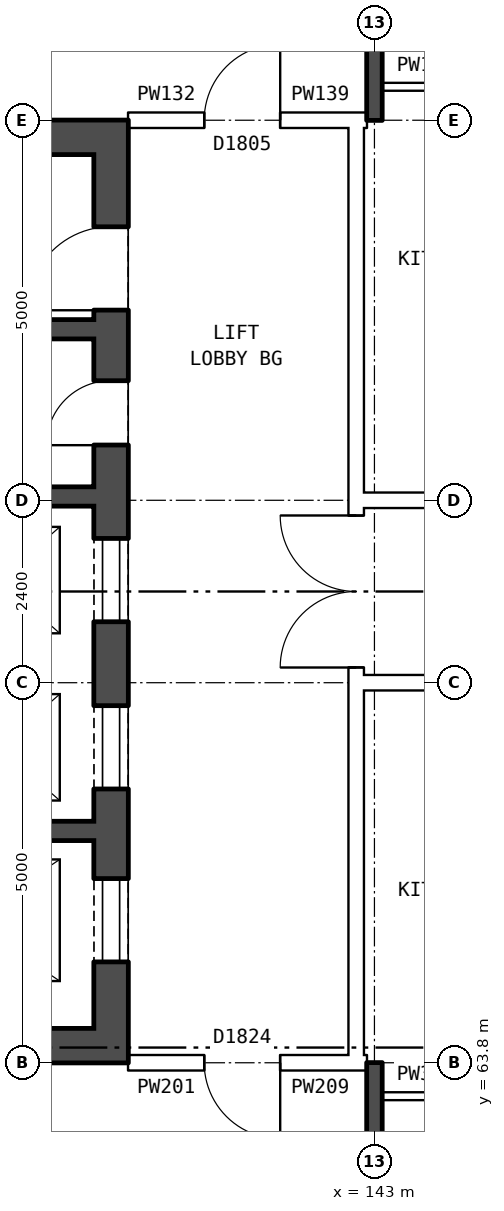
"""IFC4 building model, lengths in metres.
Left out: names, types, materials, properties, quantities, classifications, styles, units other than length and angle.
Written with IfcOpenShell. Run it as: python <this file> out.ifc"""

import sys

from ifc_helpers import new_model, si_unit, direction, frame, frame_2d, origin, place, context, subcontext, project, spatial, rectangle, extrude, element, fill, save


model = new_model("IFC4")
c1 = context("Model", 3, precision=1e-05, world=origin(), true_north=direction((0.0, 1.0)))
c2 = subcontext(c1, "Body", "Model", "MODEL_VIEW")
j1 = project(units=[si_unit("LENGTHUNIT", "METRE"), si_unit("PLANEANGLEUNIT", "RADIAN")], contexts=[c1])
p1 = place(None, origin())
s1 = spatial("IfcSite", under=j1, at=p1, CompositionType="ELEMENT")
p2 = place(p1, origin())
s2 = spatial("IfcBuilding", under=s1, at=p2, CompositionType="ELEMENT")
p3 = place(p2, frame((0.0, 0.0, 175.8)))
s3 = spatial("IfcBuildingStorey", under=s2, at=p3, CompositionType="ELEMENT", Elevation=175.8)
p4 = place(p3, frame((139.535, 63.8, 0.0), z_axis=(0.0, 0.0, 1.0), x_axis=(0.0, 1.0, 0.0)))
e1 = element("IfcWall", 1, at=p4, inside=s3, PredefinedType="SHEAR", context=c2, shape_type="SweptSolid", body=[
    extrude(rectangle(XDim=12.4, YDim=0.45, at=frame_2d((6.2, 0.0))), origin(), (0.0, 0.0, 1.0), 2.85),
])
p5 = place(p4, frame((1.325, 0.0, 0.0)))
e2 = element("IfcOpeningElement", 2, at=p5, cuts=e1, PredefinedType="OPENING", context=c2, shape_type="SweptSolid", body=[
    extrude(rectangle(XDim=1.1, YDim=2.1, at=frame_2d((0.55, 1.05))), frame((0.0, 0.235, 0.0), z_axis=(0.0, -1.0, 0.0), x_axis=(1.0, 0.0, 0.0)), (0.0, 0.0, 1.0), 0.47),
])
p6 = place(p4, frame((3.6, 0.0, 0.0)))
e3 = element("IfcOpeningElement", 3, at=p6, cuts=e1, PredefinedType="OPENING", context=c2, shape_type="SweptSolid", body=[
    extrude(rectangle(XDim=1.1, YDim=2.1, at=frame_2d((0.55, 1.05))), frame((0.0, 0.235, 0.0), z_axis=(0.0, -1.0, 0.0), x_axis=(1.0, 0.0, 0.0)), (0.0, 0.0, 1.0), 0.47),
])
p7 = place(p4, frame((5.8, 0.0, 0.0)))
e4 = element("IfcOpeningElement", 4, at=p7, cuts=e1, PredefinedType="OPENING", context=c2, shape_type="SweptSolid", body=[
    extrude(rectangle(XDim=1.1, YDim=2.1, at=frame_2d((0.55, 1.05))), frame((0.0, 0.235, 0.0), z_axis=(0.0, -1.0, 0.0), x_axis=(1.0, 0.0, 0.0)), (0.0, 0.0, 1.0), 0.47),
])
p8 = place(p4, frame((9.9, 0.0, 0.0)))
e5 = element("IfcOpeningElement", 5, at=p8, cuts=e1, PredefinedType="OPENING", context=c2, shape_type="SweptSolid", body=[
    extrude(rectangle(XDim=1.1, YDim=2.1, at=frame_2d((0.55, 1.05))), frame((0.0, 0.235, 0.0), z_axis=(0.0, -1.0, 0.0), x_axis=(1.0, 0.0, 0.0)), (0.0, 0.0, 1.0), 0.47),
])
p9 = place(p4, frame((8.125, 0.0, 0.0)))
e6 = element("IfcOpeningElement", 6, at=p9, cuts=e1, PredefinedType="OPENING", context=c2, shape_type="SweptSolid", body=[
    extrude(rectangle(XDim=0.85, YDim=2.1, at=frame_2d((0.425, 1.05))), frame((0.0, 0.235, 0.0), z_axis=(0.0, -1.0, 0.0), x_axis=(1.0, 0.0, 0.0)), (0.0, 0.0, 1.0), 0.47),
])
for number, where, z_axis, x_axis in (
    (7, (139.31, 64.025, 0.0), (0.0, 0.0, 1.0), (-1.0, 0.0, 0.0)),
    (8, (139.31, 75.975, 0.0), (0.0, 0.0, 1.0), (-1.0, 0.0, 0.0)),
):
    element("IfcWall", number, at=place(p3, frame(where, z_axis=z_axis, x_axis=x_axis)), inside=s3, PredefinedType="SHEAR", context=c2, shape_type="SweptSolid", body=[
        extrude(rectangle(XDim=7.5, YDim=0.45, at=frame_2d((3.75, 0.0))), origin(), (0.0, 0.0, 1.0), 2.85),
    ])
p10 = place(p3, frame((139.31, 66.85, 0.0), z_axis=(0.0, 0.0, 1.0), x_axis=(-1.0, 0.0, 0.0)))
e9 = element("IfcWall", 9, at=p10, inside=s3, PredefinedType="SHEAR", context=c2, shape_type="SweptSolid", body=[
    extrude(rectangle(XDim=4.675, YDim=0.25, at=frame_2d((2.337, 0.0))), origin(), (0.0, 0.0, 1.0), 2.85),
])
p11 = place(p3, frame((139.31, 71.25, 0.0), z_axis=(0.0, 0.0, 1.0), x_axis=(-1.0, 0.0, 0.0)))
e10 = element("IfcWall", 10, at=p11, inside=s3, PredefinedType="SHEAR", context=c2, shape_type="SweptSolid", body=[
    extrude(rectangle(XDim=7.5, YDim=0.25, at=frame_2d((3.75, 0.0))), origin(), (0.0, 0.0, 1.0), 2.85),
])
p12 = place(p11, frame((5.075, 0.0, 0.0)))
e11 = element("IfcOpeningElement", 11, at=p12, cuts=e10, PredefinedType="OPENING", context=c2, shape_type="SweptSolid", body=[
    extrude(rectangle(XDim=1.1, YDim=2.1, at=frame_2d((0.55, 1.05))), frame((0.0, 0.135, 0.0), z_axis=(0.0, -1.0, 0.0), x_axis=(1.0, 0.0, 0.0)), (0.0, 0.0, 1.0), 0.27),
])
p13 = place(p11, frame((2.925, 0.0, 0.0)))
e12 = element("IfcOpeningElement", 12, at=p13, cuts=e10, PredefinedType="OPENING", context=c2, shape_type="SweptSolid", body=[
    extrude(rectangle(XDim=0.85, YDim=2.1, at=frame_2d((0.425, 1.05))), frame((0.0, 0.135, 0.0), z_axis=(0.0, -1.0, 0.0), x_axis=(1.0, 0.0, 0.0)), (0.0, 0.0, 1.0), 0.27),
])
p14 = place(p3, frame((139.31, 73.45, 0.0), z_axis=(0.0, 0.0, 1.0), x_axis=(-1.0, 0.0, 0.0)))
e13 = element("IfcWall", 13, at=p14, inside=s3, PredefinedType="SHEAR", context=c2, shape_type="SweptSolid", body=[
    extrude(rectangle(XDim=2.475, YDim=0.25, at=frame_2d((1.238, 0.0))), origin(), (0.0, 0.0, 1.0), 2.85),
])
p15 = place(p3, frame((142.76, 63.9, 0.0), z_axis=(0.0, 0.0, 1.0), x_axis=(0.0, 1.0, 0.0)))
e14 = element("IfcWall", 14, at=p15, inside=s3, PredefinedType="PARTITIONING", context=c2, shape_type="SweptSolid", body=[
    extrude(rectangle(XDim=12.2, YDim=0.2, at=frame_2d((6.1, 0.0))), origin(), (0.0, 0.0, 1.0), 2.85),
])
p16 = place(p15, frame((5.1, 0.0, 0.0)))
e15 = element("IfcOpeningElement", 15, at=p16, cuts=e14, PredefinedType="OPENING", context=c2, shape_type="SweptSolid", body=[
    extrude(rectangle(XDim=2.0, YDim=2.1, at=frame_2d((1.0, 1.05))), frame((0.0, 0.11, 0.0), z_axis=(0.0, -1.0, 0.0), x_axis=(1.0, 0.0, 0.0)), (0.0, 0.0, 1.0), 0.22),
])
p17 = place(p3, frame((143.1, 63.36, 0.0), z_axis=(0.0, 0.0, 1.0), x_axis=(1.0, 0.0, 0.0)))
e16 = element("IfcWall", 16, at=p17, inside=s3, PredefinedType="PARTITIONING", context=c2, shape_type="SweptSolid", body=[
    extrude(rectangle(XDim=2.9, YDim=0.1, at=frame_2d((1.45, 0.0))), origin(), (0.0, 0.0, 1.0), 2.85),
])
p18 = place(p17, frame((1.0, 0.0, 0.0)))
e17 = element("IfcOpeningElement", 17, at=p18, cuts=e16, PredefinedType="OPENING", context=c2, shape_type="SweptSolid", body=[
    extrude(rectangle(XDim=0.9, YDim=2.1, at=frame_2d((0.45, 1.05))), frame((0.0, 0.06, 0.0), z_axis=(0.0, -1.0, 0.0), x_axis=(1.0, 0.0, 0.0)), (0.0, 0.0, 1.0), 0.12),
])
p19 = place(p3, frame((139.76, 63.8, 0.0), z_axis=(0.0, 0.0, 1.0), x_axis=(1.0, 0.0, 0.0)))
e18 = element("IfcWall", 18, at=p19, inside=s3, PredefinedType="PARTITIONING", context=c2, shape_type="SweptSolid", body=[
    extrude(rectangle(XDim=3.0, YDim=0.2, at=frame_2d((1.5, 0.0))), origin(), (0.0, 0.0, 1.0), 2.85),
])
p20 = place(p19, frame((1.0, 0.0, 0.0)))
e19 = element("IfcOpeningElement", 19, at=p20, cuts=e18, PredefinedType="OPENING", context=c2, shape_type="SweptSolid", body=[
    extrude(rectangle(XDim=1.0, YDim=2.1, at=frame_2d((0.5, 1.05))), frame((0.0, 0.11, 0.0), z_axis=(0.0, -1.0, 0.0), x_axis=(1.0, 0.0, 0.0)), (0.0, 0.0, 1.0), 0.22),
])
p21 = place(p3, frame((142.76, 63.8, 0.0), z_axis=(0.0, 0.0, 1.0), x_axis=(1.0, 0.0, 0.0)))
e20 = element("IfcWall", 20, at=p21, inside=s3, PredefinedType="PARTITIONING", context=c2, shape_type="SweptSolid", body=[
    extrude(rectangle(XDim=0.14, YDim=0.2, at=frame_2d((0.07, 0.0))), origin(), (0.0, 0.0, 1.0), 2.85),
])
p22 = place(p3, frame((142.76, 68.8, 0.0), z_axis=(0.0, 0.0, 1.0), x_axis=(1.0, 0.0, 0.0)))
e21 = element("IfcWall", 21, at=p22, inside=s3, PredefinedType="PARTITIONING", context=c2, shape_type="SweptSolid", body=[
    extrude(rectangle(XDim=14.48, YDim=0.2, at=frame_2d((7.24, 0.0))), origin(), (0.0, 0.0, 1.0), 2.85),
])
p23 = place(p22, frame((1.12, 0.0, 0.0)))
e22 = element("IfcOpeningElement", 22, at=p23, cuts=e21, PredefinedType="OPENING", context=c2, shape_type="SweptSolid", body=[
    extrude(rectangle(XDim=1.0, YDim=2.1, at=frame_2d((0.5, 1.05))), frame((0.0, 0.11, 0.0), z_axis=(0.0, -1.0, 0.0), x_axis=(1.0, 0.0, 0.0)), (0.0, 0.0, 1.0), 0.22),
])
p24 = place(p22, frame((10.24, 0.0, 0.0)))
e23 = element("IfcOpeningElement", 23, at=p24, cuts=e21, PredefinedType="OPENING", context=c2, shape_type="SweptSolid", body=[
    extrude(rectangle(XDim=1.0, YDim=2.1, at=frame_2d((0.5, 1.05))), frame((0.0, 0.11, 0.0), z_axis=(0.0, -1.0, 0.0), x_axis=(1.0, 0.0, 0.0)), (0.0, 0.0, 1.0), 0.22),
])
p25 = place(p3, frame((142.76, 71.2, 0.0), z_axis=(0.0, 0.0, 1.0), x_axis=(1.0, 0.0, 0.0)))
e24 = element("IfcWall", 24, at=p25, inside=s3, PredefinedType="PARTITIONING", context=c2, shape_type="SweptSolid", body=[
    extrude(rectangle(XDim=14.48, YDim=0.2, at=frame_2d((7.24, 0.0))), origin(), (0.0, 0.0, 1.0), 2.85),
])
p26 = place(p25, frame((1.12, 0.0, 0.0)))
e25 = element("IfcOpeningElement", 25, at=p26, cuts=e24, PredefinedType="OPENING", context=c2, shape_type="SweptSolid", body=[
    extrude(rectangle(XDim=1.0, YDim=2.1, at=frame_2d((0.5, 1.05))), frame((0.0, 0.11, 0.0), z_axis=(0.0, -1.0, 0.0), x_axis=(1.0, 0.0, 0.0)), (0.0, 0.0, 1.0), 0.22),
])
p27 = place(p25, frame((7.24, 0.0, 0.0)))
e26 = element("IfcOpeningElement", 26, at=p27, cuts=e24, PredefinedType="OPENING", context=c2, shape_type="SweptSolid", body=[
    extrude(rectangle(XDim=1.0, YDim=2.1, at=frame_2d((0.5, 1.05))), frame((0.0, 0.11, 0.0), z_axis=(0.0, -1.0, 0.0), x_axis=(1.0, 0.0, 0.0)), (0.0, 0.0, 1.0), 0.22),
])
p28 = place(p3, frame((139.76, 76.2, 0.0), z_axis=(0.0, 0.0, 1.0), x_axis=(1.0, 0.0, 0.0)))
e27 = element("IfcWall", 27, at=p28, inside=s3, PredefinedType="PARTITIONING", context=c2, shape_type="SweptSolid", body=[
    extrude(rectangle(XDim=3.0, YDim=0.2, at=frame_2d((1.5, 0.0))), origin(), (0.0, 0.0, 1.0), 2.85),
])
p29 = place(p28, frame((1.0, 0.0, 0.0)))
e28 = element("IfcOpeningElement", 28, at=p29, cuts=e27, PredefinedType="OPENING", context=c2, shape_type="SweptSolid", body=[
    extrude(rectangle(XDim=1.0, YDim=2.1, at=frame_2d((0.5, 1.05))), frame((0.0, 0.11, 0.0), z_axis=(0.0, -1.0, 0.0), x_axis=(1.0, 0.0, 0.0)), (0.0, 0.0, 1.0), 0.22),
])
p30 = place(p3, frame((142.76, 76.2, 0.0), z_axis=(0.0, 0.0, 1.0), x_axis=(1.0, 0.0, 0.0)))
e29 = element("IfcWall", 29, at=p30, inside=s3, PredefinedType="PARTITIONING", context=c2, shape_type="SweptSolid", body=[
    extrude(rectangle(XDim=0.14, YDim=0.2, at=frame_2d((0.07, 0.0))), origin(), (0.0, 0.0, 1.0), 2.85),
])
p31 = place(p3, frame((143.1, 76.64, 0.0), z_axis=(0.0, 0.0, 1.0), x_axis=(1.0, 0.0, 0.0)))
e30 = element("IfcWall", 30, at=p31, inside=s3, PredefinedType="PARTITIONING", context=c2, shape_type="SweptSolid", body=[
    extrude(rectangle(XDim=2.9, YDim=0.1, at=frame_2d((1.45, 0.0))), origin(), (0.0, 0.0, 1.0), 2.85),
])
p32 = place(p31, frame((1.0, 0.0, 0.0)))
e31 = element("IfcOpeningElement", 31, at=p32, cuts=e30, PredefinedType="OPENING", context=c2, shape_type="SweptSolid", body=[
    extrude(rectangle(XDim=0.9, YDim=2.1, at=frame_2d((0.45, 1.05))), frame((0.0, 0.06, 0.0), z_axis=(0.0, -1.0, 0.0), x_axis=(1.0, 0.0, 0.0)), (0.0, 0.0, 1.0), 0.12),
])
for number, where, z_axis, x_axis in (
    (32, (143.0, 54.36, 0.0), (0.0, 0.0, 1.0), (0.0, 1.0, 0.0)),
    (33, (143.0, 76.2, 0.0), (0.0, 0.0, 1.0), (0.0, 1.0, 0.0)),
):
    element("IfcWall", number, at=place(p3, frame(where, z_axis=z_axis, x_axis=x_axis)), inside=s3, PredefinedType="SOLIDWALL", context=c2, shape_type="SweptSolid", body=[
        extrude(rectangle(XDim=9.44, YDim=0.2, at=frame_2d((4.72, 0.0))), origin(), (0.0, 0.0, 1.0), 2.85),
    ])
p33 = place(p5, origin())
e34 = element("IfcDoor", 34, at=p33, inside=s3, OperationType="DOUBLE_DOOR_SLIDING", PredefinedType="DOOR", context=c2, shape_type="SweptSolid", body=[
    extrude(rectangle(XDim=1.1, YDim=2.1, at=frame_2d((0.55, 1.05))), frame((0.0, 0.21, 0.0), z_axis=(0.0, -1.0, 0.0), x_axis=(1.0, 0.0, 0.0)), (0.0, 0.0, 1.0), 0.05),
])
fill(e2, e34)
p34 = place(p6, origin())
e35 = element("IfcDoor", 35, at=p34, inside=s3, OperationType="DOUBLE_DOOR_SLIDING", PredefinedType="DOOR", context=c2, shape_type="SweptSolid", body=[
    extrude(rectangle(XDim=1.1, YDim=2.1, at=frame_2d((0.55, 1.05))), frame((0.0, 0.21, 0.0), z_axis=(0.0, -1.0, 0.0), x_axis=(1.0, 0.0, 0.0)), (0.0, 0.0, 1.0), 0.05),
])
fill(e3, e35)
p35 = place(p7, origin())
e36 = element("IfcDoor", 36, at=p35, inside=s3, OperationType="DOUBLE_DOOR_SLIDING", PredefinedType="DOOR", context=c2, shape_type="SweptSolid", body=[
    extrude(rectangle(XDim=1.1, YDim=2.1, at=frame_2d((0.55, 1.05))), frame((0.0, 0.21, 0.0), z_axis=(0.0, -1.0, 0.0), x_axis=(1.0, 0.0, 0.0)), (0.0, 0.0, 1.0), 0.05),
])
fill(e4, e36)
p36 = place(p8, origin())
e37 = element("IfcDoor", 37, at=p36, inside=s3, OperationType="SINGLE_SWING_LEFT", PredefinedType="DOOR", context=c2, shape_type="SweptSolid", body=[
    extrude(rectangle(XDim=1.1, YDim=2.1, at=frame_2d((0.55, 1.05))), frame((0.0, 0.21, 0.0), z_axis=(0.0, -1.0, 0.0), x_axis=(1.0, 0.0, 0.0)), (0.0, 0.0, 1.0), 0.05),
])
fill(e5, e37)
p37 = place(p9, origin())
e38 = element("IfcDoor", 38, at=p37, inside=s3, OperationType="SINGLE_SWING_LEFT", PredefinedType="DOOR", context=c2, shape_type="SweptSolid", body=[
    extrude(rectangle(XDim=0.85, YDim=2.1, at=frame_2d((0.425, 1.05))), frame((0.0, 0.21, 0.0), z_axis=(0.0, -1.0, 0.0), x_axis=(1.0, 0.0, 0.0)), (0.0, 0.0, 1.0), 0.05),
])
fill(e6, e38)
p38 = place(p16, origin())
e39 = element("IfcDoor", 39, at=p38, inside=s3, OperationType="DOUBLE_DOOR_SINGLE_SWING", PredefinedType="DOOR", context=c2, shape_type="SweptSolid", body=[
    extrude(rectangle(XDim=2.0, YDim=2.1, at=frame_2d((1.0, 1.05))), frame((0.0, 0.025, 0.0), z_axis=(0.0, -1.0, 0.0), x_axis=(1.0, 0.0, 0.0)), (0.0, 0.0, 1.0), 0.05),
])
fill(e15, e39)
p39 = place(p20, frame((1.0, 0.0, 0.0), z_axis=(0.0, 0.0, 1.0), x_axis=(-1.0, 0.0, 0.0)))
e40 = element("IfcDoor", 40, at=p39, inside=s3, OperationType="SINGLE_SWING_LEFT", PredefinedType="DOOR", context=c2, shape_type="SweptSolid", body=[
    extrude(rectangle(XDim=1.0, YDim=2.1, at=frame_2d((0.5, 1.05))), frame((0.0, 0.025, 0.0), z_axis=(0.0, -1.0, 0.0), x_axis=(1.0, 0.0, 0.0)), (0.0, 0.0, 1.0), 0.05),
])
fill(e19, e40)
p40 = place(p29, origin())
e41 = element("IfcDoor", 41, at=p40, inside=s3, OperationType="SINGLE_SWING_RIGHT", PredefinedType="DOOR", context=c2, shape_type="SweptSolid", body=[
    extrude(rectangle(XDim=1.0, YDim=2.1, at=frame_2d((0.5, 1.05))), frame((0.0, 0.025, 0.0), z_axis=(0.0, -1.0, 0.0), x_axis=(1.0, 0.0, 0.0)), (0.0, 0.0, 1.0), 0.05),
])
fill(e28, e41)
save(model, sys.argv[1])
